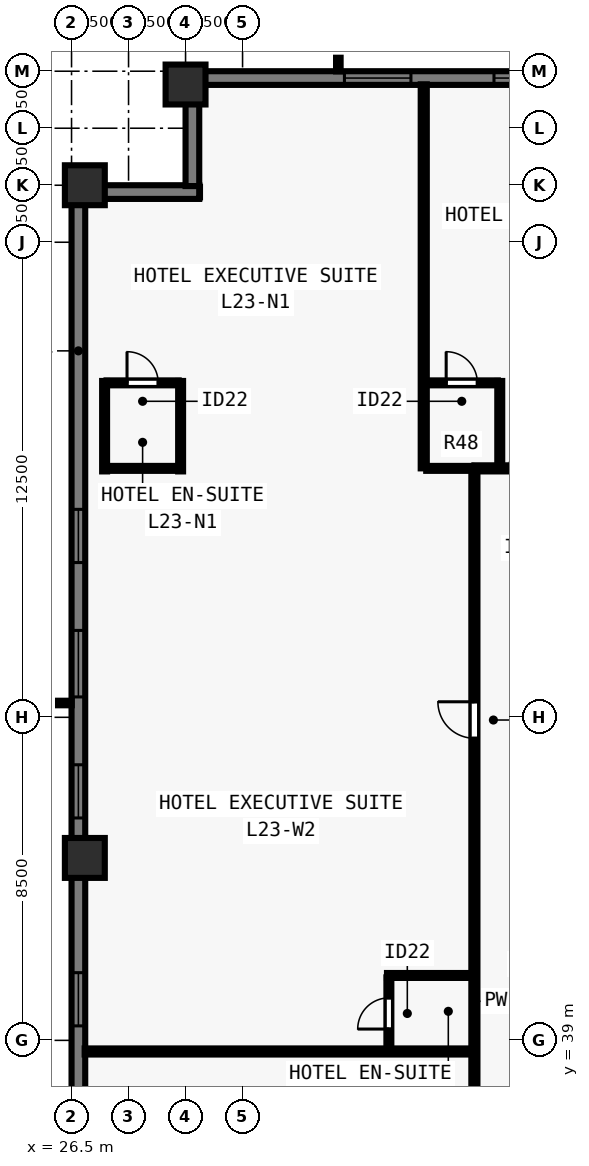
"""IFC4 building model, lengths in metres.
Left out: names, types, materials, properties, quantities, classifications, styles, units other than length and angle.
Written with IfcOpenShell. Run it as: python <this file> out.ifc"""

import sys

from ifc_helpers import new_model, si_unit, direction, frame, frame_2d, origin, origin_2d, place, context, subcontext, project, spatial, rectangle, extrude, element, fill, save


model = new_model("IFC4")
c1 = context("Model", 3, precision=1e-05, world=origin(), true_north=direction((0.0, 1.0)))
c2 = subcontext(c1, "Body", "Model", "MODEL_VIEW")
j1 = project(units=[si_unit("LENGTHUNIT", "METRE"), si_unit("PLANEANGLEUNIT", "RADIAN")], contexts=[c1])
p1 = place(None, origin())
s1 = spatial("IfcSite", under=j1, at=p1, CompositionType="ELEMENT")
p2 = place(p1, origin())
s2 = spatial("IfcBuilding", under=s1, at=p2, CompositionType="ELEMENT")
p3 = place(p2, frame((0.0, 0.0, 86.5)))
s3 = spatial("IfcBuildingStorey", under=s2, at=p3, CompositionType="ELEMENT", Elevation=86.5)
for number, where, z_axis, x_axis in (
    (1, (29.5, 64.15, 0.0), (0.0, 0.0, 1.0), (1.0, 0.0, 0.0)),
    (2, (26.85, 61.5, 0.0), (0.0, 0.0, 1.0), (0.0, 1.0, 0.0)),
    (3, (26.85, 43.8, 0.0), (0.0, 0.0, 1.0), (0.0, 1.0, 0.0)),
):
    element("IfcColumn", number, at=place(p3, frame(where, z_axis=z_axis, x_axis=x_axis)), inside=s3, PredefinedType="COLUMN", context=c2, shape_type="SweptSolid", body=[
        extrude(rectangle(XDim=1.05, YDim=1.05, at=origin_2d()), origin(), (0.0, 0.0, 1.0), 3.5),
    ])
p4 = place(p3, frame((26.68, 16.5, 0.0), z_axis=(0.0, 0.0, 1.0), x_axis=(0.0, 1.0, 0.0)))
e4 = element("IfcWall", 4, at=p4, inside=s3, PredefinedType="SOLIDWALL", context=c2, shape_type="SweptSolid", body=[
    extrude(rectangle(XDim=44.662, YDim=0.36, at=frame_2d((22.331, 0.0))), origin(), (0.0, 0.0, 1.0), 3.28),
])
p5 = place(p4, frame((8.19, 0.0, 0.8)))
e5 = element("IfcOpeningElement", 5, at=p5, cuts=e4, PredefinedType="OPENING", context=c2, shape_type="SweptSolid", body=[
    extrude(rectangle(XDim=1.4, YDim=1.544, at=frame_2d((0.7, 0.772))), frame((0.0, 0.19, 0.0), z_axis=(0.0, -1.0, 0.0), x_axis=(1.0, 0.0, 0.0)), (0.0, 0.0, 1.0), 0.38),
])
p6 = place(p4, frame((11.375, 0.0, 0.8)))
e6 = element("IfcOpeningElement", 6, at=p6, cuts=e4, PredefinedType="OPENING", context=c2, shape_type="SweptSolid", body=[
    extrude(rectangle(XDim=1.75, YDim=1.544, at=frame_2d((0.875, 0.772))), frame((0.0, 0.19, 0.0), z_axis=(0.0, -1.0, 0.0), x_axis=(1.0, 0.0, 0.0)), (0.0, 0.0, 1.0), 0.38),
])
p7 = place(p4, frame((14.911, 0.0, 0.8)))
e7 = element("IfcOpeningElement", 7, at=p7, cuts=e4, PredefinedType="OPENING", context=c2, shape_type="SweptSolid", body=[
    extrude(rectangle(XDim=1.4, YDim=1.544, at=frame_2d((0.7, 0.772))), frame((0.0, 0.19, 0.0), z_axis=(0.0, -1.0, 0.0), x_axis=(1.0, 0.0, 0.0)), (0.0, 0.0, 1.0), 0.38),
])
p8 = place(p4, frame((18.546, 0.0, 0.8)))
e8 = element("IfcOpeningElement", 8, at=p8, cuts=e4, PredefinedType="OPENING", context=c2, shape_type="SweptSolid", body=[
    extrude(rectangle(XDim=1.75, YDim=1.544, at=frame_2d((0.875, 0.772))), frame((0.0, 0.19, 0.0), z_axis=(0.0, -1.0, 0.0), x_axis=(1.0, 0.0, 0.0)), (0.0, 0.0, 1.0), 0.38),
])
p9 = place(p4, frame((22.881, 0.0, 0.8)))
e9 = element("IfcOpeningElement", 9, at=p9, cuts=e4, PredefinedType="OPENING", context=c2, shape_type="SweptSolid", body=[
    extrude(rectangle(XDim=1.4, YDim=1.544, at=frame_2d((0.7, 0.772))), frame((0.0, 0.19, 0.0), z_axis=(0.0, -1.0, 0.0), x_axis=(1.0, 0.0, 0.0)), (0.0, 0.0, 1.0), 0.38),
])
p10 = place(p4, frame((28.351, 0.0, 0.8)))
e10 = element("IfcOpeningElement", 10, at=p10, cuts=e4, PredefinedType="OPENING", context=c2, shape_type="SweptSolid", body=[
    extrude(rectangle(XDim=1.4, YDim=1.544, at=frame_2d((0.7, 0.772))), frame((0.0, 0.19, 0.0), z_axis=(0.0, -1.0, 0.0), x_axis=(1.0, 0.0, 0.0)), (0.0, 0.0, 1.0), 0.38),
])
p11 = place(p4, frame((31.537, 0.0, 0.8)))
e11 = element("IfcOpeningElement", 11, at=p11, cuts=e4, PredefinedType="OPENING", context=c2, shape_type="SweptSolid", body=[
    extrude(rectangle(XDim=1.75, YDim=1.544, at=frame_2d((0.875, 0.772))), frame((0.0, 0.19, 0.0), z_axis=(0.0, -1.0, 0.0), x_axis=(1.0, 0.0, 0.0)), (0.0, 0.0, 1.0), 0.38),
])
p12 = place(p4, frame((35.072, 0.0, 0.8)))
e12 = element("IfcOpeningElement", 12, at=p12, cuts=e4, PredefinedType="OPENING", context=c2, shape_type="SweptSolid", body=[
    extrude(rectangle(XDim=1.4, YDim=1.544, at=frame_2d((0.7, 0.772))), frame((0.0, 0.19, 0.0), z_axis=(0.0, -1.0, 0.0), x_axis=(1.0, 0.0, 0.0)), (0.0, 0.0, 1.0), 0.38),
])
p13 = place(p3, frame((26.5, 61.32, 0.0), z_axis=(0.0, 0.0, 1.0), x_axis=(1.0, 0.0, 0.0)))
e13 = element("IfcWall", 13, at=p13, inside=s3, PredefinedType="SOLIDWALL", context=c2, shape_type="SweptSolid", body=[
    extrude(rectangle(XDim=3.36, YDim=0.36, at=frame_2d((1.68, 0.0))), origin(), (0.0, 0.0, 1.0), 3.28),
])
p14 = place(p3, frame((29.68, 61.478, 0.0), z_axis=(0.0, 0.0, 1.0), x_axis=(0.0, 1.0, 0.0)))
e14 = element("IfcWall", 14, at=p14, inside=s3, PredefinedType="SOLIDWALL", context=c2, shape_type="SweptSolid", body=[
    extrude(rectangle(XDim=2.684, YDim=0.36, at=frame_2d((1.342, 0.0))), origin(), (0.0, 0.0, 1.0), 3.28),
])
p15 = place(p3, frame((29.5, 64.32, 0.0), z_axis=(0.0, 0.0, 1.0), x_axis=(1.0, 0.0, 0.0)))
e15 = element("IfcWall", 15, at=p15, inside=s3, PredefinedType="SOLIDWALL", context=c2, shape_type="SweptSolid", body=[
    extrude(rectangle(XDim=27.562, YDim=0.36, at=frame_2d((13.781, 0.0))), origin(), (0.0, 0.0, 1.0), 3.28),
])
p16 = place(p15, frame((4.18, 0.0, 0.8)))
e16 = element("IfcOpeningElement", 16, at=p16, cuts=e15, PredefinedType="OPENING", context=c2, shape_type="SweptSolid", body=[
    extrude(rectangle(XDim=1.75, YDim=1.544, at=frame_2d((0.875, 0.772))), frame((0.0, 0.19, 0.0), z_axis=(0.0, -1.0, 0.0), x_axis=(1.0, 0.0, 0.0)), (0.0, 0.0, 1.0), 0.38),
])
p17 = place(p15, frame((8.115, 0.0, 0.8)))
e17 = element("IfcOpeningElement", 17, at=p17, cuts=e15, PredefinedType="OPENING", context=c2, shape_type="SweptSolid", body=[
    extrude(rectangle(XDim=1.4, YDim=1.544, at=frame_2d((0.7, 0.772))), frame((0.0, 0.19, 0.0), z_axis=(0.0, -1.0, 0.0), x_axis=(1.0, 0.0, 0.0)), (0.0, 0.0, 1.0), 0.38),
])
p18 = place(p15, frame((11.251, 0.0, 0.8)))
e18 = element("IfcOpeningElement", 18, at=p18, cuts=e15, PredefinedType="OPENING", context=c2, shape_type="SweptSolid", body=[
    extrude(rectangle(XDim=1.75, YDim=1.544, at=frame_2d((0.875, 0.772))), frame((0.0, 0.19, 0.0), z_axis=(0.0, -1.0, 0.0), x_axis=(1.0, 0.0, 0.0)), (0.0, 0.0, 1.0), 0.38),
])
p19 = place(p15, frame((14.736, 0.0, 0.8)))
e19 = element("IfcOpeningElement", 19, at=p19, cuts=e15, PredefinedType="OPENING", context=c2, shape_type="SweptSolid", body=[
    extrude(rectangle(XDim=1.4, YDim=1.544, at=frame_2d((0.7, 0.772))), frame((0.0, 0.19, 0.0), z_axis=(0.0, -1.0, 0.0), x_axis=(1.0, 0.0, 0.0)), (0.0, 0.0, 1.0), 0.38),
])
p20 = place(p15, frame((18.721, 0.0, 0.8)))
e20 = element("IfcOpeningElement", 20, at=p20, cuts=e15, PredefinedType="OPENING", context=c2, shape_type="SweptSolid", body=[
    extrude(rectangle(XDim=1.75, YDim=1.544, at=frame_2d((0.875, 0.772))), frame((0.0, 0.19, 0.0), z_axis=(0.0, -1.0, 0.0), x_axis=(1.0, 0.0, 0.0)), (0.0, 0.0, 1.0), 0.38),
])
p21 = place(p15, frame((20.907, 0.0, 0.8)))
e21 = element("IfcOpeningElement", 21, at=p21, cuts=e15, PredefinedType="OPENING", context=c2, shape_type="SweptSolid", body=[
    extrude(rectangle(XDim=1.4, YDim=1.544, at=frame_2d((0.7, 0.772))), frame((0.0, 0.19, 0.0), z_axis=(0.0, -1.0, 0.0), x_axis=(1.0, 0.0, 0.0)), (0.0, 0.0, 1.0), 0.38),
])
p22 = place(p15, frame((23.35, 0.0, 0.8)))
e22 = element("IfcOpeningElement", 22, at=p22, cuts=e15, PredefinedType="OPENING", context=c2, shape_type="SweptSolid", body=[
    extrude(rectangle(XDim=0.9, YDim=1.544, at=frame_2d((0.45, 0.772))), frame((0.0, 0.19, 0.0), z_axis=(0.0, -1.0, 0.0), x_axis=(1.0, 0.0, 0.0)), (0.0, 0.0, 1.0), 0.38),
])
p23 = place(p3, frame((37.1, 54.05, 0.0), z_axis=(0.0, 0.0, 1.0), x_axis=(1.0, 0.0, 0.0)))
e23 = element("IfcWall", 23, at=p23, inside=s3, PredefinedType="PARTITIONING", context=c2, shape_type="SweptSolid", body=[
    extrude(rectangle(XDim=29.8, YDim=0.16, at=frame_2d((14.9, 0.0))), origin(), (0.0, 0.0, 1.0), 3.28),
])
p24 = place(p23, frame((0.91, 0.0, 0.0)))
e24 = element("IfcOpeningElement", 24, at=p24, cuts=e23, PredefinedType="OPENING", context=c2, shape_type="SweptSolid", body=[
    extrude(rectangle(XDim=0.96, YDim=2.15, at=frame_2d((0.48, 1.075))), frame((0.0, 0.09, 0.0), z_axis=(0.0, -1.0, 0.0), x_axis=(1.0, 0.0, 0.0)), (0.0, 0.0, 1.0), 0.18),
])
p25 = place(p23, frame((3.03, 0.0, 0.0)))
e25 = element("IfcOpeningElement", 25, at=p25, cuts=e23, PredefinedType="OPENING", context=c2, shape_type="SweptSolid", body=[
    extrude(rectangle(XDim=0.96, YDim=2.15, at=frame_2d((0.48, 1.075))), frame((0.0, 0.09, 0.0), z_axis=(0.0, -1.0, 0.0), x_axis=(1.0, 0.0, 0.0)), (0.0, 0.0, 1.0), 0.18),
])
p26 = place(p23, frame((11.39, 0.0, 0.0)))
e26 = element("IfcOpeningElement", 26, at=p26, cuts=e23, PredefinedType="OPENING", context=c2, shape_type="SweptSolid", body=[
    extrude(rectangle(XDim=0.96, YDim=2.15, at=frame_2d((0.48, 1.075))), frame((0.0, 0.09, 0.0), z_axis=(0.0, -1.0, 0.0), x_axis=(1.0, 0.0, 0.0)), (0.0, 0.0, 1.0), 0.18),
])
p27 = place(p23, frame((19.75, 0.0, 0.0)))
e27 = element("IfcOpeningElement", 27, at=p27, cuts=e23, PredefinedType="OPENING", context=c2, shape_type="SweptSolid", body=[
    extrude(rectangle(XDim=0.96, YDim=2.15, at=frame_2d((0.48, 1.075))), frame((0.0, 0.09, 0.0), z_axis=(0.0, -1.0, 0.0), x_axis=(1.0, 0.0, 0.0)), (0.0, 0.0, 1.0), 0.18),
])
p28 = place(p23, frame((26.931, 0.0, 0.0)))
e28 = element("IfcOpeningElement", 28, at=p28, cuts=e23, PredefinedType="OPENING", context=c2, shape_type="SweptSolid", body=[
    extrude(rectangle(XDim=0.96, YDim=2.15, at=frame_2d((0.48, 1.075))), frame((0.0, 0.09, 0.0), z_axis=(0.0, -1.0, 0.0), x_axis=(1.0, 0.0, 0.0)), (0.0, 0.0, 1.0), 0.18),
])
p29 = place(p23, frame((28.48, 0.0, 0.0)))
e29 = element("IfcOpeningElement", 29, at=p29, cuts=e23, PredefinedType="OPENING", context=c2, shape_type="SweptSolid", body=[
    extrude(rectangle(XDim=0.96, YDim=2.15, at=frame_2d((0.48, 1.075))), frame((0.0, 0.09, 0.0), z_axis=(0.0, -1.0, 0.0), x_axis=(1.0, 0.0, 0.0)), (0.0, 0.0, 1.0), 0.18),
])
p30 = place(p3, frame((37.1, 24.015, 0.0), z_axis=(0.0, 0.0, 1.0), x_axis=(0.0, 1.0, 0.0)))
e30 = element("IfcWall", 30, at=p30, inside=s3, PredefinedType="PARTITIONING", context=c2, shape_type="SweptSolid", body=[
    extrude(rectangle(XDim=29.97, YDim=0.16, at=frame_2d((14.985, 0.0))), origin(), (0.0, 0.0, 1.0), 3.28),
])
p31 = place(p30, frame((8.134, 0.0, 0.0)))
e31 = element("IfcOpeningElement", 31, at=p31, cuts=e30, PredefinedType="OPENING", context=c2, shape_type="SweptSolid", body=[
    extrude(rectangle(XDim=0.96, YDim=2.15, at=frame_2d((0.48, 1.075))), frame((0.0, 0.09, 0.0), z_axis=(0.0, -1.0, 0.0), x_axis=(1.0, 0.0, 0.0)), (0.0, 0.0, 1.0), 0.18),
])
p32 = place(p30, frame((22.934, 0.0, 0.0)))
e32 = element("IfcOpeningElement", 32, at=p32, cuts=e30, PredefinedType="OPENING", context=c2, shape_type="SweptSolid", body=[
    extrude(rectangle(XDim=0.96, YDim=2.15, at=frame_2d((0.48, 1.075))), frame((0.0, 0.09, 0.0), z_axis=(0.0, -1.0, 0.0), x_axis=(1.0, 0.0, 0.0)), (0.0, 0.0, 1.0), 0.18),
])
for number, where, z_axis, x_axis in (
    (33, (27.37, 53.97, 0.0), (0.0, 0.0, 1.0), (0.0, 1.0, 0.0)),
    (34, (29.37, 53.97, 0.0), (0.0, 0.0, 1.0), (0.0, 1.0, 0.0)),
):
    element("IfcWall", number, at=place(p3, frame(where, z_axis=z_axis, x_axis=x_axis)), inside=s3, PredefinedType="PLUMBINGWALL", context=c2, shape_type="SweptSolid", body=[
        extrude(rectangle(XDim=2.38, YDim=0.13, at=frame_2d((1.19, 0.0))), origin(), (0.0, 0.0, 1.0), 3.28),
    ])
p33 = place(p3, frame((27.42, 56.3, 0.0), z_axis=(0.0, 0.0, 1.0), x_axis=(1.0, 0.0, 0.0)))
e35 = element("IfcWall", 35, at=p33, inside=s3, PredefinedType="PLUMBINGWALL", context=c2, shape_type="SweptSolid", body=[
    extrude(rectangle(XDim=1.9, YDim=0.13, at=frame_2d((0.95, 0.0))), origin(), (0.0, 0.0, 1.0), 3.28),
])
p34 = place(p33, frame((0.54, 0.0, 0.0)))
e36 = element("IfcOpeningElement", 36, at=p34, cuts=e35, PredefinedType="OPENING", context=c2, shape_type="SweptSolid", body=[
    extrude(rectangle(XDim=0.82, YDim=2.1, at=frame_2d((0.41, 1.05))), frame((0.0, 0.075, 0.0), z_axis=(0.0, -1.0, 0.0), x_axis=(1.0, 0.0, 0.0)), (0.0, 0.0, 1.0), 0.15),
])
p35 = place(p3, frame((27.42, 54.05, 0.0), z_axis=(0.0, 0.0, 1.0), x_axis=(1.0, 0.0, 0.0)))
e37 = element("IfcWall", 37, at=p35, inside=s3, PredefinedType="PLUMBINGWALL", context=c2, shape_type="SweptSolid", body=[
    extrude(rectangle(XDim=1.9, YDim=0.13, at=frame_2d((0.95, 0.0))), origin(), (0.0, 0.0, 1.0), 3.28),
])
p36 = place(p3, frame((35.768, 54.05, 0.0), z_axis=(0.0, 0.0, 1.0), x_axis=(0.0, 1.0, 0.0)))
e38 = element("IfcWall", 38, at=p36, inside=s3, PredefinedType="PARTITIONING", context=c2, shape_type="SweptSolid", body=[
    extrude(rectangle(XDim=10.105, YDim=0.16, at=frame_2d((5.052, 0.0))), origin(), (0.0, 0.0, 1.0), 2.439),
])
p37 = place(p3, frame((37.768, 54.115, 0.0), z_axis=(0.0, 0.0, 1.0), x_axis=(0.0, 1.0, 0.0)))
e39 = element("IfcWall", 39, at=p37, inside=s3, PredefinedType="PLUMBINGWALL", context=c2, shape_type="SweptSolid", body=[
    extrude(rectangle(XDim=2.235, YDim=0.13, at=frame_2d((1.118, 0.0))), origin(), (0.0, 0.0, 1.0), 2.439),
])
p38 = place(p3, frame((35.833, 56.3, 0.0), z_axis=(0.0, 0.0, 1.0), x_axis=(1.0, 0.0, 0.0)))
e40 = element("IfcWall", 40, at=p38, inside=s3, PredefinedType="PLUMBINGWALL", context=c2, shape_type="SweptSolid", body=[
    extrude(rectangle(XDim=1.885, YDim=0.13, at=frame_2d((0.942, 0.0))), origin(), (0.0, 0.0, 1.0), 3.28),
])
p39 = place(p38, frame((0.525, 0.0, 0.0)))
e41 = element("IfcOpeningElement", 41, at=p39, cuts=e40, PredefinedType="OPENING", context=c2, shape_type="SweptSolid", body=[
    extrude(rectangle(XDim=0.82, YDim=2.1, at=frame_2d((0.41, 1.05))), frame((0.0, 0.075, 0.0), z_axis=(0.0, -1.0, 0.0), x_axis=(1.0, 0.0, 0.0)), (0.0, 0.0, 1.0), 0.15),
])
p40 = place(p3, frame((35.833, 54.05, 0.0), z_axis=(0.0, 0.0, 1.0), x_axis=(1.0, 0.0, 0.0)))
e42 = element("IfcWall", 42, at=p40, inside=s3, PredefinedType="PLUMBINGWALL", context=c2, shape_type="SweptSolid", body=[
    extrude(rectangle(XDim=1.188, YDim=0.13, at=frame_2d((0.594, 0.0))), origin(), (0.0, 0.0, 1.0), 3.28),
])
p41 = place(p3, frame((26.845, 38.708, 0.0), z_axis=(0.0, 0.0, 1.0), x_axis=(1.0, 0.0, 0.0)))
e43 = element("IfcWall", 43, at=p41, inside=s3, PredefinedType="PARTITIONING", context=c2, shape_type="SweptSolid", body=[
    extrude(rectangle(XDim=10.19, YDim=0.16, at=frame_2d((5.095, 0.0))), origin(), (0.0, 0.0, 1.0), 2.849),
])
p42 = place(p3, frame((34.8, 40.708, 0.0), z_axis=(0.0, 0.0, 1.0), x_axis=(1.0, 0.0, 0.0)))
e44 = element("IfcWall", 44, at=p42, inside=s3, PredefinedType="PLUMBINGWALL", context=c2, shape_type="SweptSolid", body=[
    extrude(rectangle(XDim=2.235, YDim=0.13, at=frame_2d((1.117, 0.0))), origin(), (0.0, 0.0, 1.0), 2.849),
])
p43 = place(p3, frame((34.85, 38.772, 0.0), z_axis=(0.0, 0.0, 1.0), x_axis=(0.0, 1.0, 0.0)))
e45 = element("IfcWall", 45, at=p43, inside=s3, PredefinedType="PLUMBINGWALL", context=c2, shape_type="SweptSolid", body=[
    extrude(rectangle(XDim=1.885, YDim=0.13, at=frame_2d((0.942, 0.0))), origin(), (0.0, 0.0, 1.0), 3.28),
])
p44 = place(p43, frame((0.525, 0.0, 0.0)))
e46 = element("IfcOpeningElement", 46, at=p44, cuts=e45, PredefinedType="OPENING", context=c2, shape_type="SweptSolid", body=[
    extrude(rectangle(XDim=0.82, YDim=2.1, at=frame_2d((0.41, 1.05))), frame((0.0, 0.075, 0.0), z_axis=(0.0, -1.0, 0.0), x_axis=(1.0, 0.0, 0.0)), (0.0, 0.0, 1.0), 0.15),
])
p45 = place(p9, origin())
e47 = element("IfcWindow", 47, at=p45, inside=s3, PartitioningType="SINGLE_PANEL", PredefinedType="WINDOW", context=c2, shape_type="SweptSolid", body=[
    extrude(rectangle(XDim=1.4, YDim=1.544, at=frame_2d((0.7, 0.772))), frame((0.0, -0.05, 0.0), z_axis=(0.0, -1.0, 0.0), x_axis=(1.0, 0.0, 0.0)), (0.0, 0.0, 1.0), 0.06),
])
fill(e9, e47)
p46 = place(p10, origin())
e48 = element("IfcWindow", 48, at=p46, inside=s3, PartitioningType="SINGLE_PANEL", PredefinedType="WINDOW", context=c2, shape_type="SweptSolid", body=[
    extrude(rectangle(XDim=1.4, YDim=1.544, at=frame_2d((0.7, 0.772))), frame((0.0, -0.05, 0.0), z_axis=(0.0, -1.0, 0.0), x_axis=(1.0, 0.0, 0.0)), (0.0, 0.0, 1.0), 0.06),
])
fill(e10, e48)
p47 = place(p11, origin())
e49 = element("IfcWindow", 49, at=p47, inside=s3, PartitioningType="SINGLE_PANEL", PredefinedType="WINDOW", context=c2, shape_type="SweptSolid", body=[
    extrude(rectangle(XDim=1.75, YDim=1.544, at=frame_2d((0.875, 0.772))), frame((0.0, -0.05, 0.0), z_axis=(0.0, -1.0, 0.0), x_axis=(1.0, 0.0, 0.0)), (0.0, 0.0, 1.0), 0.06),
])
fill(e11, e49)
p48 = place(p12, origin())
e50 = element("IfcWindow", 50, at=p48, inside=s3, PartitioningType="SINGLE_PANEL", PredefinedType="WINDOW", context=c2, shape_type="SweptSolid", body=[
    extrude(rectangle(XDim=1.4, YDim=1.544, at=frame_2d((0.7, 0.772))), frame((0.0, -0.05, 0.0), z_axis=(0.0, -1.0, 0.0), x_axis=(1.0, 0.0, 0.0)), (0.0, 0.0, 1.0), 0.06),
])
fill(e12, e50)
p49 = place(p16, origin())
e51 = element("IfcWindow", 51, at=p49, inside=s3, PartitioningType="SINGLE_PANEL", PredefinedType="WINDOW", context=c2, shape_type="SweptSolid", body=[
    extrude(rectangle(XDim=1.75, YDim=1.544, at=frame_2d((0.875, 0.772))), frame((0.0, -0.05, 0.0), z_axis=(0.0, -1.0, 0.0), x_axis=(1.0, 0.0, 0.0)), (0.0, 0.0, 1.0), 0.06),
])
fill(e16, e51)
p50 = place(p17, origin())
e52 = element("IfcWindow", 52, at=p50, inside=s3, PartitioningType="SINGLE_PANEL", PredefinedType="WINDOW", context=c2, shape_type="SweptSolid", body=[
    extrude(rectangle(XDim=1.4, YDim=1.544, at=frame_2d((0.7, 0.772))), frame((0.0, -0.05, 0.0), z_axis=(0.0, -1.0, 0.0), x_axis=(1.0, 0.0, 0.0)), (0.0, 0.0, 1.0), 0.06),
])
fill(e17, e52)
p51 = place(p34, origin())
e53 = element("IfcDoor", 53, at=p51, inside=s3, OperationType="SINGLE_SWING_LEFT", PredefinedType="DOOR", context=c2, shape_type="SweptSolid", body=[
    extrude(rectangle(XDim=0.82, YDim=2.1, at=frame_2d((0.41, 1.05))), frame((0.0, 0.025, 0.0), z_axis=(0.0, -1.0, 0.0), x_axis=(1.0, 0.0, 0.0)), (0.0, 0.0, 1.0), 0.05),
])
fill(e36, e53)
p52 = place(p24, origin())
e54 = element("IfcDoor", 54, at=p52, inside=s3, OperationType="SINGLE_SWING_RIGHT", PredefinedType="DOOR", context=c2, shape_type="SweptSolid", body=[
    extrude(rectangle(XDim=0.96, YDim=2.15, at=frame_2d((0.48, 1.075))), frame((0.0, 0.025, 0.0), z_axis=(0.0, -1.0, 0.0), x_axis=(1.0, 0.0, 0.0)), (0.0, 0.0, 1.0), 0.05),
])
fill(e24, e54)
p53 = place(p39, origin())
e55 = element("IfcDoor", 55, at=p53, inside=s3, OperationType="SINGLE_SWING_LEFT", PredefinedType="DOOR", context=c2, shape_type="SweptSolid", body=[
    extrude(rectangle(XDim=0.82, YDim=2.1, at=frame_2d((0.41, 1.05))), frame((0.0, 0.025, 0.0), z_axis=(0.0, -1.0, 0.0), x_axis=(1.0, 0.0, 0.0)), (0.0, 0.0, 1.0), 0.05),
])
fill(e41, e55)
p54 = place(p44, origin())
e56 = element("IfcDoor", 56, at=p54, inside=s3, OperationType="SINGLE_SWING_LEFT", PredefinedType="DOOR", context=c2, shape_type="SweptSolid", body=[
    extrude(rectangle(XDim=0.82, YDim=2.1, at=frame_2d((0.41, 1.05))), frame((0.0, 0.025, 0.0), z_axis=(0.0, -1.0, 0.0), x_axis=(1.0, 0.0, 0.0)), (0.0, 0.0, 1.0), 0.05),
])
fill(e46, e56)
p55 = place(p32, origin())
e57 = element("IfcDoor", 57, at=p55, inside=s3, OperationType="SINGLE_SWING_RIGHT", PredefinedType="DOOR", context=c2, shape_type="SweptSolid", body=[
    extrude(rectangle(XDim=0.96, YDim=2.15, at=frame_2d((0.48, 1.075))), frame((0.0, 0.025, 0.0), z_axis=(0.0, -1.0, 0.0), x_axis=(1.0, 0.0, 0.0)), (0.0, 0.0, 1.0), 0.05),
])
fill(e32, e57)
save(model, sys.argv[1])
